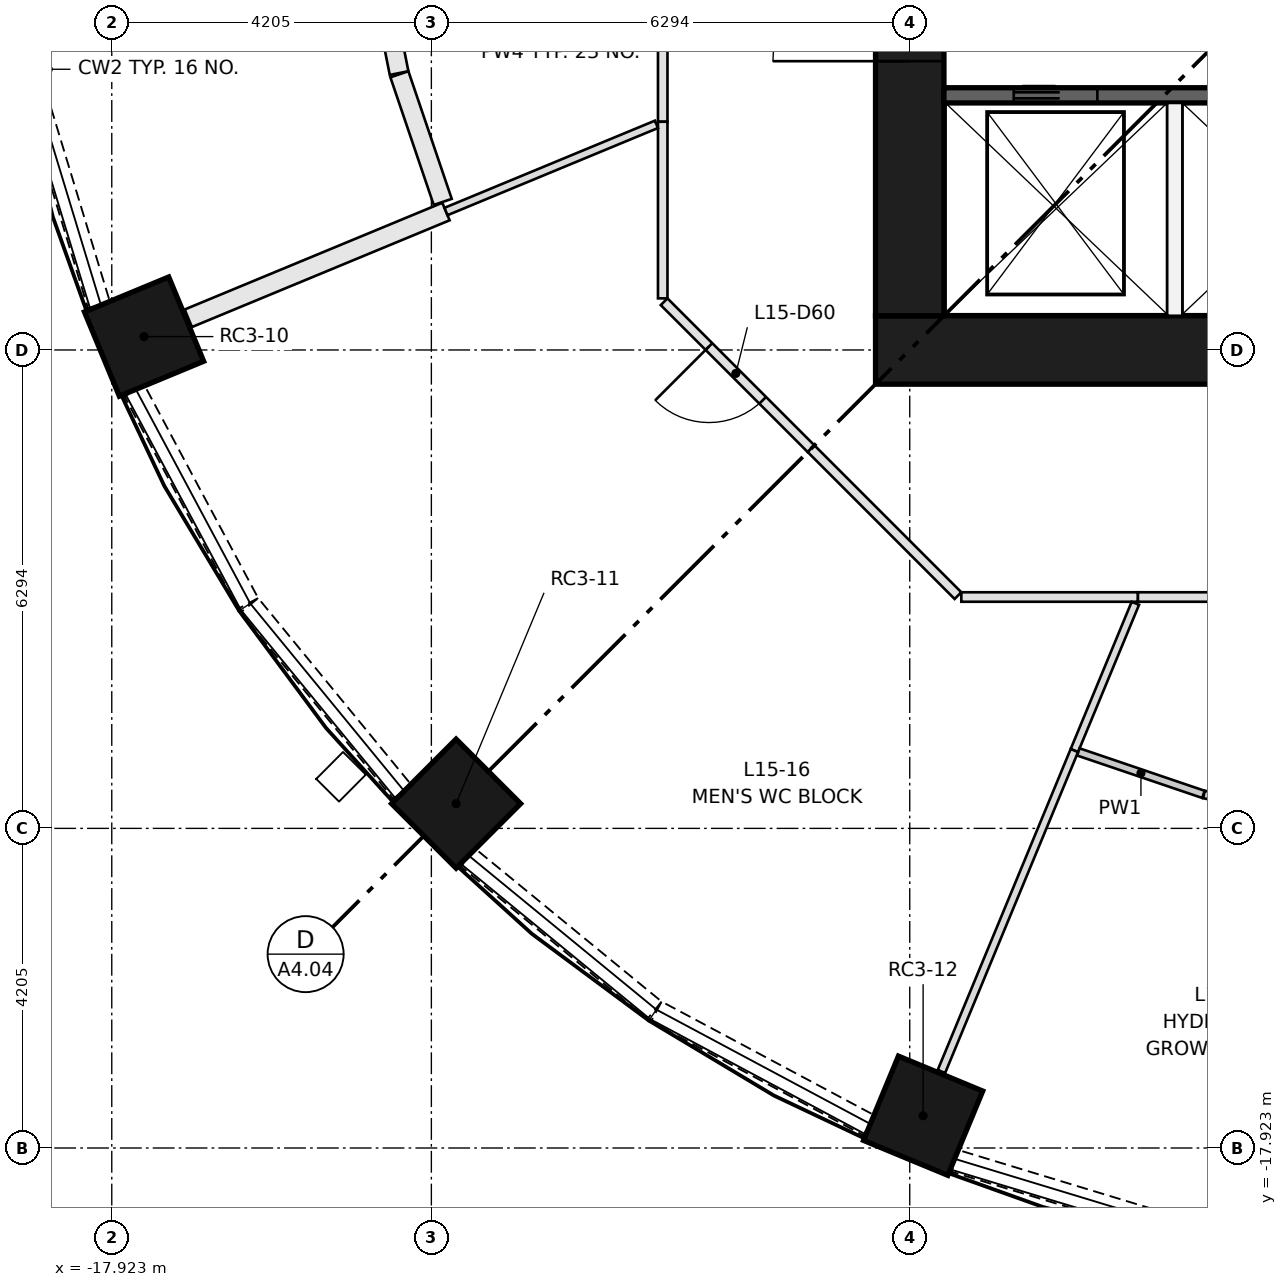
"""IFC4 building model, lengths in metres.
Left out: names, types, materials, properties, quantities, classifications, styles, units other than length and angle.
Written with IfcOpenShell. Run it as: python <this file> out.ifc"""

import sys

from ifc_helpers import new_model, si_unit, direction, frame, frame_2d, origin, origin_2d, place, context, subcontext, project, spatial, rectangle, extrude, element, fill, save


model = new_model("IFC4")
c1 = context("Model", 3, precision=1e-05, world=origin(), true_north=direction((0.0, 1.0)))
c2 = subcontext(c1, "Body", "Model", "MODEL_VIEW")
j1 = project(units=[si_unit("LENGTHUNIT", "METRE"), si_unit("PLANEANGLEUNIT", "RADIAN")], contexts=[c1])
p1 = place(None, origin())
s1 = spatial("IfcSite", under=j1, at=p1, CompositionType="ELEMENT")
p2 = place(p1, origin())
s2 = spatial("IfcBuilding", under=s1, at=p2, CompositionType="ELEMENT")
p3 = place(p2, frame((0.0, 0.0, 59.05)))
s3 = spatial("IfcBuildingStorey", under=s2, at=p3, CompositionType="ELEMENT", Elevation=59.05)
for number, where, z_axis, x_axis in (
    (1, (-17.498, -7.248, 0.0), (0.0, 0.0, 1.0), (-0.924, -0.383, 0.0)),
    (2, (-13.393, -13.393, 0.0), (0.0, 0.0, 1.0), (-0.707, -0.707, 0.0)),
    (3, (-7.248, -17.498, 0.0), (0.0, 0.0, 1.0), (-0.383, -0.924, 0.0)),
):
    element("IfcColumn", number, at=place(p3, frame(where, z_axis=z_axis, x_axis=x_axis)), inside=s3, PredefinedType="COLUMN", context=c2, shape_type="SweptSolid", body=[
        extrude(rectangle(XDim=1.2, YDim=1.2, at=origin_2d()), origin(), (0.0, 0.0, 1.0), 3.65),
    ])
p4 = place(p3, frame((-7.874, -7.424, 0.0), z_axis=(0.0, 0.0, 1.0), x_axis=(1.0, 0.0, 0.0)))
e4 = element("IfcWall", 4, at=p4, inside=s3, PredefinedType="SHEAR", context=c2, shape_type="SweptSolid", body=[
    extrude(rectangle(XDim=15.748, YDim=0.9, at=frame_2d((7.874, 0.0))), origin(), (0.0, 0.0, 1.0), 3.65),
])
p5 = place(p3, frame((-7.424, -6.974, 0.0), z_axis=(0.0, 0.0, 1.0), x_axis=(0.0, 1.0, 0.0)))
e5 = element("IfcWall", 5, at=p5, inside=s3, PredefinedType="SHEAR", context=c2, shape_type="SweptSolid", body=[
    extrude(rectangle(XDim=13.948, YDim=0.9, at=frame_2d((6.974, 0.0))), origin(), (0.0, 0.0, 1.0), 3.65),
])
p6 = place(p5, frame((6.474, 0.0, 0.0)))
e6 = element("IfcOpeningElement", 6, at=p6, cuts=e5, PredefinedType="OPENING", context=c2, shape_type="SweptSolid", body=[
    extrude(rectangle(XDim=1.0, YDim=2.1, at=frame_2d((0.5, 1.05))), frame((0.0, 0.46, 0.0), z_axis=(0.0, -1.0, 0.0), x_axis=(1.0, 0.0, 0.0)), (0.0, 0.0, 1.0), 0.92),
])
p7 = place(p5, frame((3.35, 0.0, 0.0)))
e7 = element("IfcOpeningElement", 7, at=p7, cuts=e5, PredefinedType="OPENING", context=c2, shape_type="SweptSolid", body=[
    extrude(rectangle(XDim=1.8, YDim=2.1, at=frame_2d((0.9, 1.05))), frame((0.0, 0.46, 0.0), z_axis=(0.0, -1.0, 0.0), x_axis=(1.0, 0.0, 0.0)), (0.0, 0.0, 1.0), 0.92),
])
p8 = place(p5, frame((8.799, 0.0, 0.0)))
e8 = element("IfcOpeningElement", 8, at=p8, cuts=e5, PredefinedType="OPENING", context=c2, shape_type="SweptSolid", body=[
    extrude(rectangle(XDim=1.8, YDim=2.1, at=frame_2d((0.9, 1.05))), frame((0.0, 0.46, 0.0), z_axis=(0.0, -1.0, 0.0), x_axis=(1.0, 0.0, 0.0)), (0.0, 0.0, 1.0), 0.92),
])
p9 = place(p5, frame((11.974, 0.0, 0.0)))
e9 = element("IfcOpeningElement", 9, at=p9, cuts=e5, PredefinedType="OPENING", context=c2, shape_type="SweptSolid", body=[
    extrude(rectangle(XDim=1.0, YDim=2.1, at=frame_2d((0.5, 1.05))), frame((0.0, 0.46, 0.0), z_axis=(0.0, -1.0, 0.0), x_axis=(1.0, 0.0, 0.0)), (0.0, 0.0, 1.0), 0.92),
])
p10 = place(p3, frame((-6.974, -4.074, 0.0), z_axis=(0.0, 0.0, 1.0), x_axis=(1.0, 0.0, 0.0)))
e10 = element("IfcWall", 10, at=p10, inside=s3, PredefinedType="SHEAR", context=c2, shape_type="SweptSolid", body=[
    extrude(rectangle(XDim=13.948, YDim=0.2, at=frame_2d((6.974, 0.0))), origin(), (0.0, 0.0, 1.0), 3.3),
])
p11 = place(p10, frame((0.918, 0.0, 0.0)))
e11 = element("IfcOpeningElement", 11, at=p11, cuts=e10, PredefinedType="OPENING", context=c2, shape_type="SweptSolid", body=[
    extrude(rectangle(XDim=1.1, YDim=2.1, at=frame_2d((0.55, 1.05))), frame((0.0, 0.11, 0.0), z_axis=(0.0, -1.0, 0.0), x_axis=(1.0, 0.0, 0.0)), (0.0, 0.0, 1.0), 0.22),
])
p12 = place(p10, frame((4.055, 0.0, 0.0)))
e12 = element("IfcOpeningElement", 12, at=p12, cuts=e10, PredefinedType="OPENING", context=c2, shape_type="SweptSolid", body=[
    extrude(rectangle(XDim=1.1, YDim=2.1, at=frame_2d((0.55, 1.05))), frame((0.0, 0.11, 0.0), z_axis=(0.0, -1.0, 0.0), x_axis=(1.0, 0.0, 0.0)), (0.0, 0.0, 1.0), 0.22),
])
p13 = place(p10, frame((6.658, 0.0, 0.0)))
e13 = element("IfcOpeningElement", 13, at=p13, cuts=e10, PredefinedType="OPENING", context=c2, shape_type="SweptSolid", body=[
    extrude(rectangle(XDim=1.0, YDim=2.1, at=frame_2d((0.5, 1.05))), frame((0.0, 0.11, 0.0), z_axis=(0.0, -1.0, 0.0), x_axis=(1.0, 0.0, 0.0)), (0.0, 0.0, 1.0), 0.22),
])
p14 = place(p10, frame((8.627, 0.0, 0.0)))
e14 = element("IfcOpeningElement", 14, at=p14, cuts=e10, PredefinedType="OPENING", context=c2, shape_type="SweptSolid", body=[
    extrude(rectangle(XDim=1.0, YDim=2.1, at=frame_2d((0.5, 1.05))), frame((0.0, 0.11, 0.0), z_axis=(0.0, -1.0, 0.0), x_axis=(1.0, 0.0, 0.0)), (0.0, 0.0, 1.0), 0.22),
])
p15 = place(p10, frame((10.595, 0.0, 0.0)))
e15 = element("IfcOpeningElement", 15, at=p15, cuts=e10, PredefinedType="OPENING", context=c2, shape_type="SweptSolid", body=[
    extrude(rectangle(XDim=1.0, YDim=2.1, at=frame_2d((0.5, 1.05))), frame((0.0, 0.11, 0.0), z_axis=(0.0, -1.0, 0.0), x_axis=(1.0, 0.0, 0.0)), (0.0, 0.0, 1.0), 0.22),
])
p16 = place(p10, frame((12.564, 0.0, 0.0)))
e16 = element("IfcOpeningElement", 16, at=p16, cuts=e10, PredefinedType="OPENING", context=c2, shape_type="SweptSolid", body=[
    extrude(rectangle(XDim=1.0, YDim=2.1, at=frame_2d((0.5, 1.05))), frame((0.0, 0.11, 0.0), z_axis=(0.0, -1.0, 0.0), x_axis=(1.0, 0.0, 0.0)), (0.0, 0.0, 1.0), 0.22),
])
p17 = place(p3, frame((-3.937, -6.974, 0.0), z_axis=(0.0, 0.0, 1.0), x_axis=(0.0, 1.0, 0.0)))
e17 = element("IfcWall", 17, at=p17, inside=s3, PredefinedType="PARTITIONING", context=c2, shape_type="SweptSolid", body=[
    extrude(rectangle(XDim=2.8, YDim=0.2, at=frame_2d((1.4, 0.0))), origin(), (0.0, 0.0, 1.0), 3.3),
])
p18 = place(p3, frame((-19.013, -3.797, 0.0), z_axis=(0.0, 0.0, 1.0), x_axis=(0.290456409527, -0.956888224489, 0.0)))
e18 = element("IfcWall", 18, at=p18, inside=s3, PredefinedType="SOLIDWALL", context=c2, shape_type="SweptSolid", body=[
    extrude(rectangle(XDim=3.169, YDim=0.3, at=frame_2d((1.584, 0.0))), origin(), (0.0, 0.0, 1.0), 0.9),
])
p19 = place(p3, frame((-17.623, -7.963, 0.0), z_axis=(0.0, 0.0, 1.0), x_axis=(0.47123575379, -0.882007292685, 0.0)))
e19 = element("IfcWall", 19, at=p19, inside=s3, PredefinedType="SOLIDWALL", context=c2, shape_type="SweptSolid", body=[
    extrude(rectangle(XDim=3.17, YDim=0.3, at=frame_2d((1.585, 0.0))), origin(), (0.0, 0.0, 1.0), 0.9),
])
for number, where, z_axis, x_axis in (
    (20, (-16.113, -10.784, 0.0), (0.0, 0.0, 1.0), (0.634, -0.773, 0.0)),
    (21, (-13.234, -14.103, 0.0), (0.0, 0.0, 1.0), (0.773, -0.634, 0.0)),
):
    element("IfcWall", number, at=place(p3, frame(where, z_axis=z_axis, x_axis=x_axis)), inside=s3, PredefinedType="SOLIDWALL", context=c2, shape_type="SweptSolid", body=[
        extrude(rectangle(XDim=3.169, YDim=0.3, at=frame_2d((1.585, 0.0))), origin(), (0.0, 0.0, 1.0), 0.9),
    ])
p20 = place(p3, frame((-10.759, -16.129, 0.0), z_axis=(0.0, 0.0, 1.0), x_axis=(0.882007292685, -0.47123575379, 0.0)))
e22 = element("IfcWall", 22, at=p20, inside=s3, PredefinedType="SOLIDWALL", context=c2, shape_type="SweptSolid", body=[
    extrude(rectangle(XDim=3.17, YDim=0.3, at=frame_2d((1.585, 0.0))), origin(), (0.0, 0.0, 1.0), 0.9),
])
p21 = place(p3, frame((-6.83, -18.092, 0.0), z_axis=(0.0, 0.0, 1.0), x_axis=(0.956888224489, -0.290456409527, 0.0)))
e23 = element("IfcWall", 23, at=p21, inside=s3, PredefinedType="SOLIDWALL", context=c2, shape_type="SweptSolid", body=[
    extrude(rectangle(XDim=3.169, YDim=0.3, at=frame_2d((1.584, 0.0))), origin(), (0.0, 0.0, 1.0), 0.9),
])
p22 = place(p3, frame((-10.674, -4.421, 0.0), z_axis=(0.0, 0.0, 1.0), x_axis=(0.0, 1.0, 0.0)))
e24 = element("IfcWall", 24, at=p22, inside=s3, PredefinedType="PARTITIONING", context=c2, shape_type="SweptSolid", body=[
    extrude(rectangle(XDim=4.484, YDim=0.125, at=frame_2d((2.242, 0.0))), origin(), (0.0, 0.0, 1.0), 3.3),
])
p23 = place(p22, frame((1.7, 0.0, 0.0)))
e25 = element("IfcOpeningElement", 25, at=p23, cuts=e24, PredefinedType="OPENING", context=c2, shape_type="SweptSolid", body=[
    extrude(rectangle(XDim=1.0, YDim=2.1, at=frame_2d((0.5, 1.05))), frame((0.0, 0.073, 0.0), z_axis=(0.0, -1.0, 0.0), x_axis=(1.0, 0.0, 0.0)), (0.0, 0.0, 1.0), 0.145),
])
p24 = place(p3, frame((-10.674, -6.745, 0.0), z_axis=(0.0, 0.0, 1.0), x_axis=(0.0, 1.0, 0.0)))
e26 = element("IfcWall", 26, at=p24, inside=s3, PredefinedType="PARTITIONING", context=c2, shape_type="SweptSolid", body=[
    extrude(rectangle(XDim=2.324, YDim=0.125, at=frame_2d((1.162, 0.0))), origin(), (0.0, 0.0, 1.0), 3.3),
])
p25 = place(p3, frame((-8.722, -8.722, 0.0), z_axis=(0.0, 0.0, 1.0), x_axis=(-0.707151428813, 0.707062130741, 0.0)))
e27 = element("IfcWall", 27, at=p25, inside=s3, PredefinedType="PARTITIONING", context=c2, shape_type="SweptSolid", body=[
    extrude(rectangle(XDim=2.734, YDim=0.125, at=frame_2d((1.367, 0.0))), origin(), (0.0, 0.0, 1.0), 3.3),
])
p26 = place(p25, frame((0.9, 0.0, 0.0)))
e28 = element("IfcOpeningElement", 28, at=p26, cuts=e27, PredefinedType="OPENING", context=c2, shape_type="SweptSolid", body=[
    extrude(rectangle(XDim=1.0, YDim=2.1, at=frame_2d((0.5, 1.05))), frame((0.0, 0.073, 0.0), z_axis=(0.0, -1.0, 0.0), x_axis=(1.0, 0.0, 0.0)), (0.0, 0.0, 1.0), 0.145),
])
p27 = place(p3, frame((-6.789, -10.656, 0.0), z_axis=(0.0, 0.0, 1.0), x_axis=(-0.707062130741, 0.707151428813, 0.0)))
e29 = element("IfcWall", 29, at=p27, inside=s3, PredefinedType="PARTITIONING", context=c2, shape_type="SweptSolid", body=[
    extrude(rectangle(XDim=2.734, YDim=0.125, at=frame_2d((1.367, 0.0))), origin(), (0.0, 0.0, 1.0), 3.3),
])
p28 = place(p3, frame((-4.421, -10.674, 0.0), z_axis=(0.0, 0.0, 1.0), x_axis=(-1.0, 0.0, 0.0)))
e30 = element("IfcWall", 30, at=p28, inside=s3, PredefinedType="PARTITIONING", context=c2, shape_type="SweptSolid", body=[
    extrude(rectangle(XDim=2.324, YDim=0.125, at=frame_2d((1.162, 0.0))), origin(), (0.0, 0.0, 1.0), 3.3),
])
p29 = place(p3, frame((0.0, -10.674, 0.0), z_axis=(0.0, 0.0, 1.0), x_axis=(-1.0, 0.0, 0.0)))
e31 = element("IfcWall", 31, at=p29, inside=s3, PredefinedType="PARTITIONING", context=c2, shape_type="SweptSolid", body=[
    extrude(rectangle(XDim=4.421, YDim=0.125, at=frame_2d((2.211, 0.0))), origin(), (0.0, 0.0, 1.0), 3.3),
])
p30 = place(p29, frame((1.7, 0.0, 0.0)))
e32 = element("IfcOpeningElement", 32, at=p30, cuts=e31, PredefinedType="OPENING", context=c2, shape_type="SweptSolid", body=[
    extrude(rectangle(XDim=1.0, YDim=2.1, at=frame_2d((0.5, 1.05))), frame((0.0, 0.073, 0.0), z_axis=(0.0, -1.0, 0.0), x_axis=(1.0, 0.0, 0.0)), (0.0, 0.0, 1.0), 0.145),
])
p31 = place(p3, frame((-14.513, -1.919, 0.0), z_axis=(0.0, 0.0, 1.0), x_axis=(0.195077379777, -0.980787854686, 0.0)))
e33 = element("IfcWall", 33, at=p31, inside=s3, PredefinedType="PARTITIONING", context=c2, shape_type="SweptSolid", body=[
    extrude(rectangle(XDim=1.898, YDim=0.25, at=frame_2d((0.949, 0.0))), origin(), (0.0, 0.0, 1.0), 3.3),
])
p32 = place(p3, frame((-14.139, -3.797, 0.0), z_axis=(0.0, 0.0, 1.0), x_axis=(0.321468303742, -0.946920339674, 0.0)))
e34 = element("IfcWall", 34, at=p32, inside=s3, PredefinedType="PARTITIONING", context=c2, shape_type="SweptSolid", body=[
    extrude(rectangle(XDim=1.773, YDim=0.25, at=frame_2d((0.887, 0.0))), origin(), (0.0, 0.0, 1.0), 3.3),
])
p33 = place(p3, frame((-13.526, -5.603, 0.0), z_axis=(0.0, 0.0, 1.0), x_axis=(-0.923870076355, -0.382706260748, 0.0)))
e35 = element("IfcWall", 35, at=p33, inside=s3, PredefinedType="PARTITIONING", context=c2, shape_type="SweptSolid", body=[
    extrude(rectangle(XDim=3.67, YDim=0.25, at=frame_2d((1.835, 0.0))), origin(), (0.0, 0.0, 1.0), 3.3),
])
p34 = place(p3, frame((-10.757, -4.456, 0.0), z_axis=(0.0, 0.0, 1.0), x_axis=(-0.923879826967, -0.382682721486, 0.0)))
e36 = element("IfcWall", 36, at=p34, inside=s3, PredefinedType="PARTITIONING", context=c2, shape_type="SweptSolid", body=[
    extrude(rectangle(XDim=2.997, YDim=0.105, at=frame_2d((1.499, 0.0))), origin(), (0.0, 0.0, 1.0), 3.3),
])
p35 = place(p3, frame((-4.456, -10.757, 0.0), z_axis=(0.0, 0.0, 1.0), x_axis=(-0.382663674763, -0.92388771613, 0.0)))
e37 = element("IfcWall", 37, at=p35, inside=s3, PredefinedType="PARTITIONING", context=c2, shape_type="SweptSolid", body=[
    extrude(rectangle(XDim=2.097, YDim=0.105, at=frame_2d((1.049, 0.0))), origin(), (0.0, 0.0, 1.0), 3.3),
])
p36 = place(p3, frame((-5.258, -12.694, 0.0), z_axis=(0.0, 0.0, 1.0), x_axis=(-0.382710364739, -0.923868376297, 0.0)))
e38 = element("IfcWall", 38, at=p36, inside=s3, PredefinedType="PARTITIONING", context=c2, shape_type="SweptSolid", body=[
    extrude(rectangle(XDim=4.57, YDim=0.105, at=frame_2d((2.285, 0.0))), origin(), (0.0, 0.0, 1.0), 3.3),
])
p37 = place(p3, frame((-3.559, -13.271, 0.0), z_axis=(0.0, 0.0, 1.0), x_axis=(-0.946941295521, 0.321406569374, 0.0)))
e39 = element("IfcWall", 39, at=p37, inside=s3, PredefinedType="PARTITIONING", context=c2, shape_type="SweptSolid", body=[
    extrude(rectangle(XDim=1.738, YDim=0.1, at=frame_2d((0.869, 0.0))), origin(), (0.0, 0.0, 1.0), 3.3),
])
p38 = place(p3, frame((-1.797, -13.622, 0.0), z_axis=(0.0, 0.0, 1.0), x_axis=(-0.980784643133, 0.195093525761, 0.0)))
e40 = element("IfcWall", 40, at=p38, inside=s3, PredefinedType="PARTITIONING", context=c2, shape_type="SweptSolid", body=[
    extrude(rectangle(XDim=1.791, YDim=0.1, at=frame_2d((0.896, 0.0))), origin(), (0.0, 0.0, 1.0), 3.3),
])
p39 = place(p11, origin())
e41 = element("IfcDoor", 41, at=p39, inside=s3, OperationType="DOUBLE_DOOR_SLIDING", PredefinedType="DOOR", context=c2, shape_type="SweptSolid", body=[
    extrude(rectangle(XDim=1.1, YDim=2.1, at=frame_2d((0.55, 1.05))), frame((0.0, 0.025, 0.0), z_axis=(0.0, -1.0, 0.0), x_axis=(1.0, 0.0, 0.0)), (0.0, 0.0, 1.0), 0.05),
])
fill(e11, e41)
p40 = place(p7, origin())
e42 = element("IfcDoor", 42, at=p40, inside=s3, OperationType="DOUBLE_DOOR_SINGLE_SWING", PredefinedType="DOOR", context=c2, shape_type="SweptSolid", body=[
    extrude(rectangle(XDim=1.8, YDim=2.1, at=frame_2d((0.9, 1.05))), frame((0.0, 0.025, 0.0), z_axis=(0.0, -1.0, 0.0), x_axis=(1.0, 0.0, 0.0)), (0.0, 0.0, 1.0), 0.05),
])
fill(e7, e42)
p41 = place(p26, origin())
e43 = element("IfcDoor", 43, at=p41, inside=s3, OperationType="SINGLE_SWING_RIGHT", PredefinedType="DOOR", context=c2, shape_type="SweptSolid", body=[
    extrude(rectangle(XDim=1.0, YDim=2.1, at=frame_2d((0.5, 1.05))), frame((0.0, 0.025, 0.0), z_axis=(0.0, -1.0, 0.0), x_axis=(1.0, 0.0, 0.0)), (0.0, 0.0, 1.0), 0.05),
])
fill(e28, e43)
save(model, sys.argv[1])
